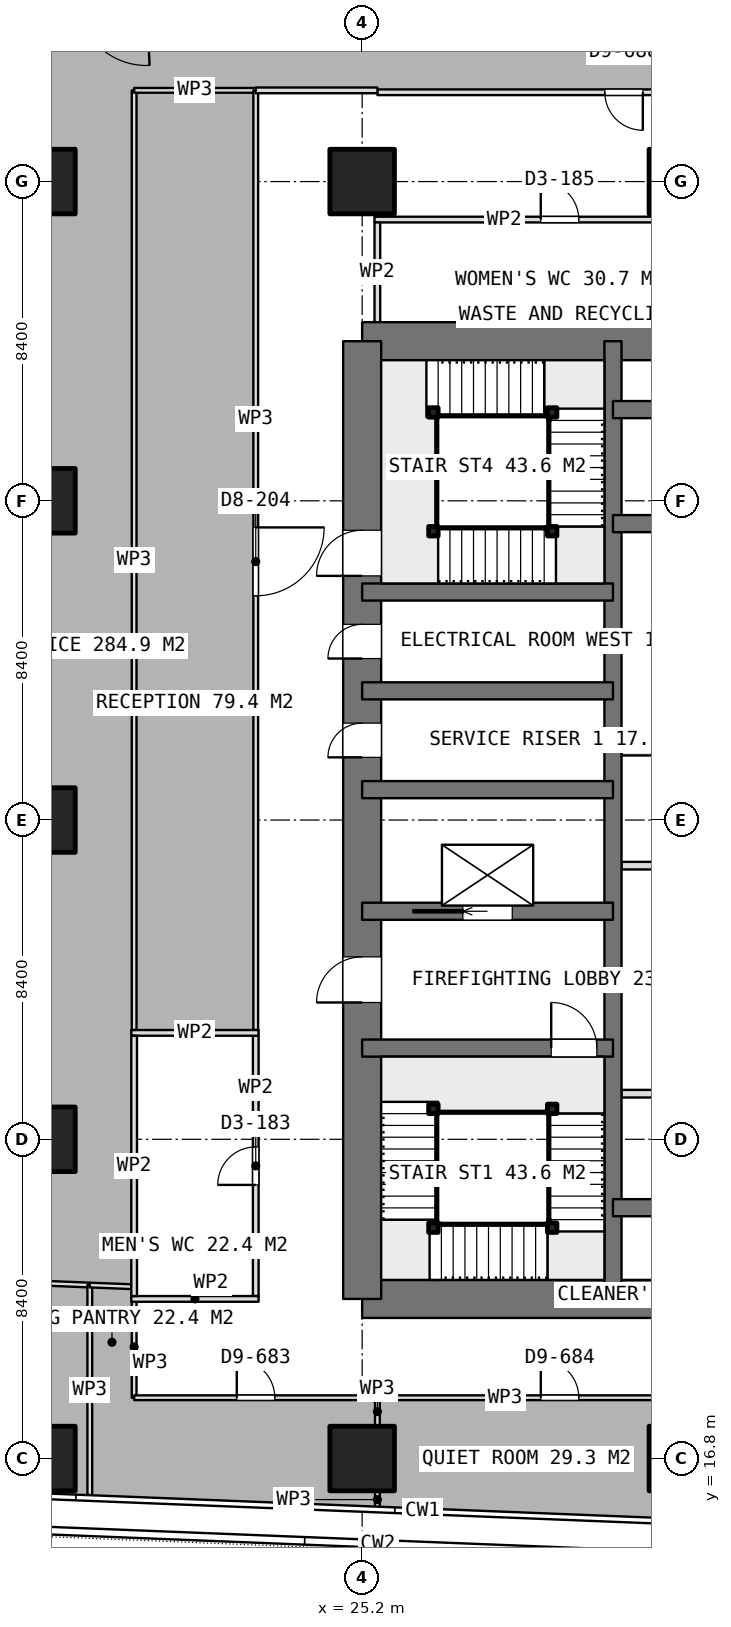
"""IFC4 building model, lengths in metres.
Left out: names, types, materials, properties, quantities, classifications, styles, units other than length and angle.
Written with IfcOpenShell. Run it as: python <this file> out.ifc"""

import sys

from ifc_helpers import new_model, si_unit, direction, frame, frame_2d, origin, origin_2d, place, context, subcontext, project, spatial, rectangle, extrude, element, fill, save


model = new_model("IFC4")
c1 = context("Model", 3, precision=1e-05, world=origin(), true_north=direction((0.0, 1.0)))
c2 = subcontext(c1, "Body", "Model", "MODEL_VIEW")
j1 = project(units=[si_unit("LENGTHUNIT", "METRE"), si_unit("PLANEANGLEUNIT", "RADIAN")], contexts=[c1])
p1 = place(None, origin())
s1 = spatial("IfcSite", under=j1, at=p1, CompositionType="ELEMENT")
p2 = place(p1, origin())
s2 = spatial("IfcBuilding", under=s1, at=p2, CompositionType="ELEMENT")
p3 = place(p2, frame((0.0, 0.0, 176.45)))
s3 = spatial("IfcBuildingStorey", under=s2, at=p3, CompositionType="ELEMENT", Elevation=176.45)
for number, where, z_axis, x_axis in (
    (1, (25.2, 21.0, 0.0), (0.0, 0.0, 1.0), (1.0, 0.0, 0.0)),
    (2, (25.2, 46.2, 0.0), (0.0, 0.0, 1.0), (1.0, 0.0, 0.0)),
):
    element("IfcWall", number, at=place(p3, frame(where, z_axis=z_axis, x_axis=x_axis)), inside=s3, PredefinedType="SHEAR", context=c2, shape_type="SweptSolid", body=[
        extrude(rectangle(XDim=10.4, YDim=1.0, at=frame_2d((5.2, 0.0))), origin(), (0.0, 0.0, 1.0), 3.75),
    ])
p4 = place(p3, frame((25.2, 21.0, 0.0), z_axis=(0.0, 0.0, 1.0), x_axis=(0.0, 1.0, 0.0)))
e3 = element("IfcWall", 3, at=p4, inside=s3, PredefinedType="SHEAR", context=c2, shape_type="SweptSolid", body=[
    extrude(rectangle(XDim=25.2, YDim=1.0, at=frame_2d((12.6, 0.0))), origin(), (0.0, 0.0, 1.0), 3.75),
])
p5 = place(p4, frame((7.8, 0.0, 0.0)))
e4 = element("IfcOpeningElement", 4, at=p5, cuts=e3, PredefinedType="OPENING", context=c2, shape_type="SweptSolid", body=[
    extrude(rectangle(XDim=1.2, YDim=2.1, at=frame_2d((0.6, 1.05))), frame((0.0, 0.51, 0.0), z_axis=(0.0, -1.0, 0.0), x_axis=(1.0, 0.0, 0.0)), (0.0, 0.0, 1.0), 1.02),
])
p6 = place(p4, frame((14.25, 0.0, 0.0)))
e5 = element("IfcOpeningElement", 5, at=p6, cuts=e3, PredefinedType="OPENING", context=c2, shape_type="SweptSolid", body=[
    extrude(rectangle(XDim=0.9, YDim=2.1, at=frame_2d((0.45, 1.05))), frame((0.0, 0.51, 0.0), z_axis=(0.0, -1.0, 0.0), x_axis=(1.0, 0.0, 0.0)), (0.0, 0.0, 1.0), 1.02),
])
p7 = place(p4, frame((16.85, 0.0, 0.0)))
e6 = element("IfcOpeningElement", 6, at=p7, cuts=e3, PredefinedType="OPENING", context=c2, shape_type="SweptSolid", body=[
    extrude(rectangle(XDim=0.9, YDim=2.1, at=frame_2d((0.45, 1.05))), frame((0.0, 0.51, 0.0), z_axis=(0.0, -1.0, 0.0), x_axis=(1.0, 0.0, 0.0)), (0.0, 0.0, 1.0), 1.02),
])
p8 = place(p4, frame((19.025, 0.0, 0.0)))
e7 = element("IfcOpeningElement", 7, at=p8, cuts=e3, PredefinedType="OPENING", context=c2, shape_type="SweptSolid", body=[
    extrude(rectangle(XDim=1.2, YDim=2.1, at=frame_2d((0.6, 1.05))), frame((0.0, 0.51, 0.0), z_axis=(0.0, -1.0, 0.0), x_axis=(1.0, 0.0, 0.0)), (0.0, 0.0, 1.0), 1.02),
])
p9 = place(p3, frame((31.8, 21.0, 0.0), z_axis=(0.0, 0.0, 1.0), x_axis=(0.0, 1.0, 0.0)))
e8 = element("IfcWall", 8, at=p9, inside=s3, PredefinedType="SHEAR", context=c2, shape_type="SweptSolid", body=[
    extrude(rectangle(XDim=25.2, YDim=0.45, at=frame_2d((12.6, 0.0))), origin(), (0.0, 0.0, 1.0), 3.75),
])
for number, where, z_axis, x_axis in (
    (9, (31.8, 23.4, 0.0), (0.0, 0.0, 1.0), (1.0, 0.0, 0.0)),
    (10, (31.8, 41.4, 0.0), (0.0, 0.0, 1.0), (1.0, 0.0, 0.0)),
    (11, (31.8, 44.4, 0.0), (0.0, 0.0, 1.0), (1.0, 0.0, 0.0)),
):
    element("IfcWall", number, at=place(p3, frame(where, z_axis=z_axis, x_axis=x_axis)), inside=s3, PredefinedType="SHEAR", context=c2, shape_type="SweptSolid", body=[
        extrude(rectangle(XDim=3.8, YDim=0.45, at=frame_2d((1.9, 0.0))), origin(), (0.0, 0.0, 1.0), 3.75),
    ])
p10 = place(p3, frame((25.2, 27.6, 0.0), z_axis=(0.0, 0.0, 1.0), x_axis=(1.0, 0.0, 0.0)))
e12 = element("IfcWall", 12, at=p10, inside=s3, PredefinedType="SHEAR", context=c2, shape_type="SweptSolid", body=[
    extrude(rectangle(XDim=6.6, YDim=0.45, at=frame_2d((3.3, 0.0))), origin(), (0.0, 0.0, 1.0), 3.75),
])
p11 = place(p10, frame((4.975, 0.0, 0.0)))
e13 = element("IfcOpeningElement", 13, at=p11, cuts=e12, PredefinedType="OPENING", context=c2, shape_type="SweptSolid", body=[
    extrude(rectangle(XDim=1.2, YDim=2.1, at=frame_2d((0.6, 1.05))), frame((0.0, 0.235, 0.0), z_axis=(0.0, -1.0, 0.0), x_axis=(1.0, 0.0, 0.0)), (0.0, 0.0, 1.0), 0.47),
])
p12 = place(p3, frame((25.2, 31.2, 0.0), z_axis=(0.0, 0.0, 1.0), x_axis=(1.0, 0.0, 0.0)))
e14 = element("IfcWall", 14, at=p12, inside=s3, PredefinedType="SHEAR", context=c2, shape_type="SweptSolid", body=[
    extrude(rectangle(XDim=6.6, YDim=0.45, at=frame_2d((3.3, 0.0))), origin(), (0.0, 0.0, 1.0), 3.75),
])
p13 = place(p12, frame((2.65, 0.0, 0.0)))
e15 = element("IfcOpeningElement", 15, at=p13, cuts=e14, PredefinedType="OPENING", context=c2, shape_type="SweptSolid", body=[
    extrude(rectangle(XDim=1.3, YDim=2.1, at=frame_2d((0.65, 1.05))), frame((0.0, 0.235, 0.0), z_axis=(0.0, -1.0, 0.0), x_axis=(1.0, 0.0, 0.0)), (0.0, 0.0, 1.0), 0.47),
])
for number, where, z_axis, x_axis in (
    (16, (25.2, 34.4, 0.0), (0.0, 0.0, 1.0), (1.0, 0.0, 0.0)),
    (17, (25.2, 37.0, 0.0), (0.0, 0.0, 1.0), (1.0, 0.0, 0.0)),
    (18, (25.2, 39.6, 0.0), (0.0, 0.0, 1.0), (1.0, 0.0, 0.0)),
):
    element("IfcWall", number, at=place(p3, frame(where, z_axis=z_axis, x_axis=x_axis)), inside=s3, PredefinedType="SHEAR", context=c2, shape_type="SweptSolid", body=[
        extrude(rectangle(XDim=6.6, YDim=0.45, at=frame_2d((3.3, 0.0))), origin(), (0.0, 0.0, 1.0), 3.75),
    ])
for number, where, z_axis, x_axis in (
    (19, (16.8, 16.8, 0.0), (0.0, 0.0, 1.0), (1.0, 0.0, 0.0)),
    (20, (16.8, 25.2, 0.0), (0.0, 0.0, 1.0), (1.0, 0.0, 0.0)),
    (21, (16.8, 33.6, 0.0), (0.0, 0.0, 1.0), (1.0, 0.0, 0.0)),
    (22, (16.8, 42.0, 0.0), (0.0, 0.0, 1.0), (1.0, 0.0, 0.0)),
    (23, (16.8, 50.4, 0.0), (0.0, 0.0, 1.0), (1.0, 0.0, 0.0)),
    (24, (25.2, 16.8, 0.0), (0.0, 0.0, 1.0), (1.0, 0.0, 0.0)),
    (25, (25.2, 50.4, 0.0), (0.0, 0.0, 1.0), (1.0, 0.0, 0.0)),
    (26, (33.6, 16.8, 0.0), (0.0, 0.0, 1.0), (1.0, 0.0, 0.0)),
    (27, (33.6, 50.4, 0.0), (0.0, 0.0, 1.0), (1.0, 0.0, 0.0)),
):
    element("IfcColumn", number, at=place(p3, frame(where, z_axis=z_axis, x_axis=x_axis)), inside=s3, PredefinedType="COLUMN", context=c2, shape_type="SweptSolid", body=[
        extrude(rectangle(XDim=1.7, YDim=1.7, at=origin_2d()), origin(), (0.0, 0.0, 1.0), 3.75),
    ])
for number, where, z_axis, x_axis in (
    (28, (32.025, 26.4, 0.0), (0.0, 0.0, 1.0), (1.0, 0.0, 0.0)),
    (29, (32.025, 29.4, 0.0), (0.0, 0.0, 1.0), (1.0, 0.0, 0.0)),
    (30, (32.025, 32.4, 0.0), (0.0, 0.0, 1.0), (1.0, 0.0, 0.0)),
    (31, (32.025, 35.4, 0.0), (0.0, 0.0, 1.0), (1.0, 0.0, 0.0)),
    (32, (32.025, 38.4, 0.0), (0.0, 0.0, 1.0), (1.0, 0.0, 0.0)),
):
    element("IfcWall", number, at=place(p3, frame(where, z_axis=z_axis, x_axis=x_axis)), inside=s3, PredefinedType="PARTITIONING", context=c2, shape_type="SweptSolid", body=[
        extrude(rectangle(XDim=3.075, YDim=0.2, at=frame_2d((1.538, 0.0))), origin(), (0.0, 0.0, 1.0), 3.5),
    ])
p14 = place(p3, frame((25.525, 49.4, 0.0), z_axis=(0.0, 0.0, 1.0), x_axis=(1.0, 0.0, 0.0)))
e33 = element("IfcWall", 33, at=p14, inside=s3, PredefinedType="PARTITIONING", context=c2, shape_type="SweptSolid", body=[
    extrude(rectangle(XDim=9.75, YDim=0.15, at=frame_2d((4.875, 0.0))), origin(), (0.0, 0.0, 1.0), 3.5),
])
p15 = place(p14, frame((4.375, 0.0, 0.0)))
e34 = element("IfcOpeningElement", 34, at=p15, cuts=e33, PredefinedType="OPENING", context=c2, shape_type="SweptSolid", body=[
    extrude(rectangle(XDim=1.0, YDim=2.1, at=frame_2d((0.5, 1.05))), frame((0.0, 0.085, 0.0), z_axis=(0.0, -1.0, 0.0), x_axis=(1.0, 0.0, 0.0)), (0.0, 0.0, 1.0), 0.17),
])
p16 = place(p3, frame((25.6, 46.7, 0.0), z_axis=(0.0, 0.0, 1.0), x_axis=(0.0, 1.0, 0.0)))
e35 = element("IfcWall", 35, at=p16, inside=s3, PredefinedType="PARTITIONING", context=c2, shape_type="SweptSolid", body=[
    extrude(rectangle(XDim=2.625, YDim=0.15, at=frame_2d((1.312, 0.0))), origin(), (0.0, 0.0, 1.0), 3.5),
])
for number, where, z_axis, x_axis in (
    (36, (19.125, 21.0, 0.0), (0.0, 0.0, 1.0), (1.0, 0.0, 0.0)),
    (37, (19.125, 28.0, 0.0), (0.0, 0.0, 1.0), (1.0, 0.0, 0.0)),
):
    element("IfcWall", number, at=place(p3, frame(where, z_axis=z_axis, x_axis=x_axis)), inside=s3, PredefinedType="PARTITIONING", context=c2, shape_type="SweptSolid", body=[
        extrude(rectangle(XDim=3.35, YDim=0.15, at=frame_2d((1.675, 0.0))), origin(), (0.0, 0.0, 1.0), 3.5),
    ])
p17 = place(p3, frame((19.2, 21.075, 0.0), z_axis=(0.0, 0.0, 1.0), x_axis=(0.0, 1.0, 0.0)))
e38 = element("IfcWall", 38, at=p17, inside=s3, PredefinedType="PARTITIONING", context=c2, shape_type="SweptSolid", body=[
    extrude(rectangle(XDim=6.85, YDim=0.15, at=frame_2d((3.425, 0.0))), origin(), (0.0, 0.0, 1.0), 3.5),
])
p18 = place(p3, frame((22.4, 21.075, 0.0), z_axis=(0.0, 0.0, 1.0), x_axis=(0.0, 1.0, 0.0)))
e39 = element("IfcWall", 39, at=p18, inside=s3, PredefinedType="PARTITIONING", context=c2, shape_type="SweptSolid", body=[
    extrude(rectangle(XDim=6.85, YDim=0.15, at=frame_2d((3.425, 0.0))), origin(), (0.0, 0.0, 1.0), 3.5),
])
p19 = place(p18, frame((2.925, 0.0, 0.0)))
e40 = element("IfcOpeningElement", 40, at=p19, cuts=e39, PredefinedType="OPENING", context=c2, shape_type="SweptSolid", body=[
    extrude(rectangle(XDim=1.0, YDim=2.1, at=frame_2d((0.5, 1.05))), frame((0.0, 0.085, 0.0), z_axis=(0.0, -1.0, 0.0), x_axis=(1.0, 0.0, 0.0)), (0.0, 0.0, 1.0), 0.17),
])
p20 = place(p3, frame((13.044, 21.564, 0.0), z_axis=(0.0, 0.0, 1.0), x_axis=(0.999205638445, -0.039850873273, 0.0)))
e41 = element("IfcWall", 41, at=p20, inside=s3, PredefinedType="PARTITIONING", context=c2, shape_type="SweptSolid", body=[
    extrude(rectangle(XDim=4.993, YDim=0.125, at=frame_2d((2.497, 0.0))), origin(), (0.0, 0.0, 1.0), 3.5),
])
p21 = place(p20, frame((1.596, 0.0, 0.0)))
e42 = element("IfcOpeningElement", 42, at=p21, cuts=e41, PredefinedType="OPENING", context=c2, shape_type="SweptSolid", body=[
    extrude(rectangle(XDim=1.8, YDim=2.1, at=frame_2d((0.9, 1.05))), frame((0.0, 0.073, 0.0), z_axis=(0.0, -1.0, 0.0), x_axis=(1.0, 0.0, 0.0)), (0.0, 0.0, 1.0), 0.145),
])
p22 = place(p3, frame((18.033, 21.365, 0.0), z_axis=(0.0, 0.0, 1.0), x_axis=(0.0, -1.0, 0.0)))
e43 = element("IfcWall", 43, at=p22, inside=s3, PredefinedType="PARTITIONING", context=c2, shape_type="SweptSolid", body=[
    extrude(rectangle(XDim=5.524, YDim=0.125, at=frame_2d((2.762, 0.0))), origin(), (0.0, 0.0, 1.0), 3.5),
])
p23 = place(p3, frame((25.601, 18.4, 0.0), z_axis=(0.0, 0.0, 1.0), x_axis=(0.0, -1.0, 0.0)))
e44 = element("IfcWall", 44, at=p23, inside=s3, PredefinedType="PARTITIONING", context=c2, shape_type="SweptSolid", body=[
    extrude(rectangle(XDim=0.73, YDim=0.125, at=frame_2d((0.365, 0.0))), origin(), (0.0, 0.0, 1.0), 3.5),
])
p24 = place(p3, frame((25.601, 15.93, 0.0), z_axis=(0.0, 0.0, 1.0), x_axis=(0.0, -1.0, 0.0)))
e45 = element("IfcWall", 45, at=p24, inside=s3, PredefinedType="PARTITIONING", context=c2, shape_type="SweptSolid", body=[
    extrude(rectangle(XDim=0.421, YDim=0.125, at=frame_2d((0.21, 0.0))), origin(), (0.0, 0.0, 1.0), 3.5),
])
p25 = place(p3, frame((18.034, 21.365, 0.0), z_axis=(0.0, 0.0, 1.0), x_axis=(0.999225413712, -0.039351907096, 0.0)))
e46 = element("IfcWall", 46, at=p25, inside=s3, PredefinedType="PARTITIONING", context=c2, shape_type="SweptSolid", body=[
    extrude(rectangle(XDim=1.092, YDim=0.125, at=frame_2d((0.546, 0.0))), origin(), (0.0, 0.0, 1.0), 3.5),
])
p26 = place(p3, frame((19.2, 21.074, 0.0), z_axis=(0.0, 0.0, 1.0), x_axis=(0.0, -1.0, 0.0)))
e47 = element("IfcWall", 47, at=p26, inside=s3, PredefinedType="PARTITIONING", context=c2, shape_type="SweptSolid", body=[
    extrude(rectangle(XDim=2.674, YDim=0.125, at=frame_2d((1.337, 0.0))), origin(), (0.0, 0.0, 1.0), 3.5),
])
p27 = place(p3, frame((19.2, 18.4, 0.0), z_axis=(0.0, 0.0, 1.0), x_axis=(1.0, 0.0, 0.0)))
e48 = element("IfcWall", 48, at=p27, inside=s3, PredefinedType="PARTITIONING", context=c2, shape_type="SweptSolid", body=[
    extrude(rectangle(XDim=6.401, YDim=0.125, at=frame_2d((3.201, 0.0))), origin(), (0.0, 0.0, 1.0), 3.5),
])
p28 = place(p27, frame((2.701, 0.0, 0.0)))
e49 = element("IfcOpeningElement", 49, at=p28, cuts=e48, PredefinedType="OPENING", context=c2, shape_type="SweptSolid", body=[
    extrude(rectangle(XDim=1.0, YDim=2.1, at=frame_2d((0.5, 1.05))), frame((0.0, 0.073, 0.0), z_axis=(0.0, -1.0, 0.0), x_axis=(1.0, 0.0, 0.0)), (0.0, 0.0, 1.0), 0.145),
])
p29 = place(p3, frame((25.602, 18.4, 0.0), z_axis=(0.0, 0.0, 1.0), x_axis=(1.0, 0.0, 0.0)))
e50 = element("IfcWall", 50, at=p29, inside=s3, PredefinedType="PARTITIONING", context=c2, shape_type="SweptSolid", body=[
    extrude(rectangle(XDim=9.597, YDim=0.125, at=frame_2d((4.798, 0.0))), origin(), (0.0, 0.0, 1.0), 3.5),
])
p30 = place(p29, frame((4.299, 0.0, 0.0)))
e51 = element("IfcOpeningElement", 51, at=p30, cuts=e50, PredefinedType="OPENING", context=c2, shape_type="SweptSolid", body=[
    extrude(rectangle(XDim=1.0, YDim=2.1, at=frame_2d((0.5, 1.05))), frame((0.0, 0.073, 0.0), z_axis=(0.0, -1.0, 0.0), x_axis=(1.0, 0.0, 0.0)), (0.0, 0.0, 1.0), 0.145),
])
p31 = place(p3, frame((19.2, 28.075, 0.0), z_axis=(0.0, 0.0, 1.0), x_axis=(0.0, 1.0, 0.0)))
e52 = element("IfcWall", 52, at=p31, inside=s3, PredefinedType="PARTITIONING", context=c2, shape_type="SweptSolid", body=[
    extrude(rectangle(XDim=24.725, YDim=0.125, at=frame_2d((12.363, 0.0))), origin(), (0.0, 0.0, 1.0), 3.5),
])
p32 = place(p3, frame((19.2, 52.8, 0.0), z_axis=(0.0, 0.0, 1.0), x_axis=(1.0, 0.0, 0.0)))
e53 = element("IfcWall", 53, at=p32, inside=s3, PredefinedType="PARTITIONING", context=c2, shape_type="SweptSolid", body=[
    extrude(rectangle(XDim=3.2, YDim=0.125, at=frame_2d((1.6, 0.0))), origin(), (0.0, 0.0, 1.0), 3.5),
])
p33 = place(p3, frame((22.4, 52.8, 0.0), z_axis=(0.0, 0.0, 1.0), x_axis=(0.0, -1.0, 0.0)))
e54 = element("IfcWall", 54, at=p33, inside=s3, PredefinedType="PARTITIONING", context=c2, shape_type="SweptSolid", body=[
    extrude(rectangle(XDim=24.725, YDim=0.125, at=frame_2d((12.363, 0.0))), origin(), (0.0, 0.0, 1.0), 3.5),
])
p34 = place(p33, frame((11.5, 0.0, 0.0)))
e55 = element("IfcOpeningElement", 55, at=p34, cuts=e54, PredefinedType="OPENING", context=c2, shape_type="SweptSolid", body=[
    extrude(rectangle(XDim=1.8, YDim=2.1, at=frame_2d((0.9, 1.05))), frame((0.0, 0.073, 0.0), z_axis=(0.0, -1.0, 0.0), x_axis=(1.0, 0.0, 0.0)), (0.0, 0.0, 1.0), 0.145),
])
p35 = place(p3, frame((38.57, 52.75, 0.0), z_axis=(0.0, 0.0, 1.0), x_axis=(-1.0, 0.0, 0.0)))
e56 = element("IfcWall", 56, at=p35, inside=s3, PredefinedType="PARTITIONING", context=c2, shape_type="SweptSolid", body=[
    extrude(rectangle(XDim=12.968, YDim=0.15, at=frame_2d((6.484, 0.0))), origin(), (0.0, 0.0, 1.0), 3.5),
])
p36 = place(p35, frame((5.984, 0.0, 0.0)))
e57 = element("IfcOpeningElement", 57, at=p36, cuts=e56, PredefinedType="OPENING", context=c2, shape_type="SweptSolid", body=[
    extrude(rectangle(XDim=1.0, YDim=2.1, at=frame_2d((0.5, 1.05))), frame((0.0, 0.085, 0.0), z_axis=(0.0, -1.0, 0.0), x_axis=(1.0, 0.0, 0.0)), (0.0, 0.0, 1.0), 0.17),
])
p37 = place(p3, frame((25.602, 52.8, 0.0), z_axis=(0.0, 0.0, 1.0), x_axis=(-1.0, 0.0, 0.0)))
e58 = element("IfcWall", 58, at=p37, inside=s3, PredefinedType="PARTITIONING", context=c2, shape_type="SweptSolid", body=[
    extrude(rectangle(XDim=3.202, YDim=0.15, at=frame_2d((1.601, 0.0))), origin(), (0.0, 0.0, 1.0), 3.5),
])
for number, where, z_axis, x_axis in (
    (59, (30.2, 26.0, 0.0), (0.0, 0.0, 1.0), (1.0, 0.0, 0.0)),
    (60, (30.2, 22.875, 0.0), (0.0, 0.0, 1.0), (1.0, 0.0, 0.0)),
    (61, (27.075, 22.875, 0.0), (0.0, 0.0, 1.0), (1.0, 0.0, 0.0)),
    (62, (27.075, 26.0, 0.0), (0.0, 0.0, 1.0), (1.0, 0.0, 0.0)),
    (63, (27.075, 41.2, 0.0), (0.0, 0.0, 1.0), (1.0, 0.0, 0.0)),
    (64, (30.2, 41.2, 0.0), (0.0, 0.0, 1.0), (1.0, 0.0, 0.0)),
    (65, (30.2, 44.325, 0.0), (0.0, 0.0, 1.0), (1.0, 0.0, 0.0)),
    (66, (27.075, 44.325, 0.0), (0.0, 0.0, 1.0), (1.0, 0.0, 0.0)),
):
    element("IfcColumn", number, at=place(p3, frame(where, z_axis=z_axis, x_axis=x_axis)), inside=s3, PredefinedType="COLUMN", context=c2, shape_type="SweptSolid", body=[
        extrude(rectangle(XDim=0.25, YDim=0.25, at=origin_2d()), origin(), (0.0, 0.0, 1.0), 3.75),
    ])
p38 = place(p5, origin())
e67 = element("IfcDoor", 67, at=p38, inside=s3, OperationType="SINGLE_SWING_LEFT", PredefinedType="DOOR", context=c2, shape_type="SweptSolid", body=[
    extrude(rectangle(XDim=1.2, YDim=2.1, at=frame_2d((0.6, 1.05))), frame((0.0, 0.025, 0.0), z_axis=(0.0, -1.0, 0.0), x_axis=(1.0, 0.0, 0.0)), (0.0, 0.0, 1.0), 0.05),
])
fill(e4, e67)
p39 = place(p6, origin())
e68 = element("IfcDoor", 68, at=p39, inside=s3, OperationType="SINGLE_SWING_LEFT", PredefinedType="DOOR", context=c2, shape_type="SweptSolid", body=[
    extrude(rectangle(XDim=0.9, YDim=2.1, at=frame_2d((0.45, 1.05))), frame((0.0, 0.025, 0.0), z_axis=(0.0, -1.0, 0.0), x_axis=(1.0, 0.0, 0.0)), (0.0, 0.0, 1.0), 0.05),
])
fill(e5, e68)
p40 = place(p7, origin())
e69 = element("IfcDoor", 69, at=p40, inside=s3, OperationType="SINGLE_SWING_LEFT", PredefinedType="DOOR", context=c2, shape_type="SweptSolid", body=[
    extrude(rectangle(XDim=0.9, YDim=2.1, at=frame_2d((0.45, 1.05))), frame((0.0, 0.025, 0.0), z_axis=(0.0, -1.0, 0.0), x_axis=(1.0, 0.0, 0.0)), (0.0, 0.0, 1.0), 0.05),
])
fill(e6, e69)
p41 = place(p13, origin())
e70 = element("IfcDoor", 70, at=p41, inside=s3, OperationType="SLIDING_TO_LEFT", PredefinedType="USERDEFINED", context=c2, shape_type="SweptSolid", body=[
    extrude(rectangle(XDim=1.3, YDim=2.1, at=frame_2d((0.65, 1.05))), frame((0.0, 0.025, 0.0), z_axis=(0.0, -1.0, 0.0), x_axis=(1.0, 0.0, 0.0)), (0.0, 0.0, 1.0), 0.05),
])
fill(e15, e70)
p42 = place(p15, origin())
e71 = element("IfcDoor", 71, at=p42, inside=s3, OperationType="SINGLE_SWING_LEFT", PredefinedType="DOOR", context=c2, shape_type="SweptSolid", body=[
    extrude(rectangle(XDim=1.0, YDim=2.1, at=frame_2d((0.5, 1.05))), frame((0.0, 0.025, 0.0), z_axis=(0.0, -1.0, 0.0), x_axis=(1.0, 0.0, 0.0)), (0.0, 0.0, 1.0), 0.05),
])
fill(e34, e71)
p43 = place(p19, origin())
e72 = element("IfcDoor", 72, at=p43, inside=s3, OperationType="SINGLE_SWING_LEFT", PredefinedType="DOOR", context=c2, shape_type="SweptSolid", body=[
    extrude(rectangle(XDim=1.0, YDim=2.1, at=frame_2d((0.5, 1.05))), frame((0.0, 0.025, 0.0), z_axis=(0.0, -1.0, 0.0), x_axis=(1.0, 0.0, 0.0)), (0.0, 0.0, 1.0), 0.05),
])
fill(e40, e72)
p44 = place(p28, origin())
e73 = element("IfcDoor", 73, at=p44, inside=s3, OperationType="SINGLE_SWING_LEFT", PredefinedType="DOOR", context=c2, shape_type="SweptSolid", body=[
    extrude(rectangle(XDim=1.0, YDim=2.1, at=frame_2d((0.5, 1.05))), frame((0.0, 0.025, 0.0), z_axis=(0.0, -1.0, 0.0), x_axis=(1.0, 0.0, 0.0)), (0.0, 0.0, 1.0), 0.05),
])
fill(e49, e73)
p45 = place(p30, origin())
e74 = element("IfcDoor", 74, at=p45, inside=s3, OperationType="SINGLE_SWING_LEFT", PredefinedType="DOOR", context=c2, shape_type="SweptSolid", body=[
    extrude(rectangle(XDim=1.0, YDim=2.1, at=frame_2d((0.5, 1.05))), frame((0.0, 0.025, 0.0), z_axis=(0.0, -1.0, 0.0), x_axis=(1.0, 0.0, 0.0)), (0.0, 0.0, 1.0), 0.05),
])
fill(e51, e74)
p46 = place(p34, origin())
e75 = element("IfcDoor", 75, at=p46, inside=s3, OperationType="DOUBLE_DOOR_SINGLE_SWING", PredefinedType="DOOR", context=c2, shape_type="SweptSolid", body=[
    extrude(rectangle(XDim=1.8, YDim=2.1, at=frame_2d((0.9, 1.05))), frame((0.0, 0.025, 0.0), z_axis=(0.0, -1.0, 0.0), x_axis=(1.0, 0.0, 0.0)), (0.0, 0.0, 1.0), 0.05),
])
fill(e55, e75)
p47 = place(p36, origin())
e76 = element("IfcDoor", 76, at=p47, inside=s3, OperationType="SINGLE_SWING_LEFT", PredefinedType="DOOR", context=c2, shape_type="SweptSolid", body=[
    extrude(rectangle(XDim=1.0, YDim=2.1, at=frame_2d((0.5, 1.05))), frame((0.0, 0.025, 0.0), z_axis=(0.0, -1.0, 0.0), x_axis=(1.0, 0.0, 0.0)), (0.0, 0.0, 1.0), 0.05),
])
fill(e57, e76)
p48 = place(p11, origin())
e77 = element("IfcDoor", 77, at=p48, inside=s3, OperationType="SINGLE_SWING_RIGHT", PredefinedType="DOOR", context=c2, shape_type="SweptSolid", body=[
    extrude(rectangle(XDim=1.2, YDim=2.1, at=frame_2d((0.6, 1.05))), frame((0.0, 0.025, 0.0), z_axis=(0.0, -1.0, 0.0), x_axis=(1.0, 0.0, 0.0)), (0.0, 0.0, 1.0), 0.05),
])
fill(e13, e77)
p49 = place(p8, origin())
e78 = element("IfcDoor", 78, at=p49, inside=s3, OperationType="SINGLE_SWING_RIGHT", PredefinedType="DOOR", context=c2, shape_type="SweptSolid", body=[
    extrude(rectangle(XDim=1.2, YDim=2.1, at=frame_2d((0.6, 1.05))), frame((0.0, 0.025, 0.0), z_axis=(0.0, -1.0, 0.0), x_axis=(1.0, 0.0, 0.0)), (0.0, 0.0, 1.0), 0.05),
])
fill(e7, e78)
save(model, sys.argv[1])
